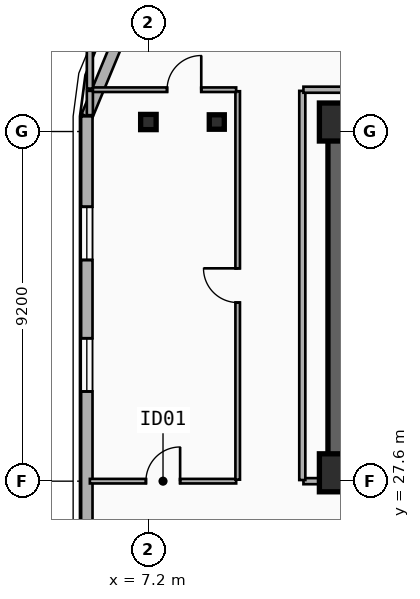
"""IFC4 building model, lengths in metres.
Left out: names, types, materials, properties, quantities, classifications, styles, units other than length and angle.
Written with IfcOpenShell. Run it as: python <this file> out.ifc"""

import sys

from ifc_helpers import new_model, si_unit, direction, frame, frame_2d, origin, origin_2d, place, context, subcontext, project, spatial, rectangle, i_section, extrude, element, fill, save


model = new_model("IFC4")
c1 = context("Model", 3, precision=1e-05, world=origin(), true_north=direction((0.0, 1.0)))
c2 = subcontext(c1, "Body", "Model", "MODEL_VIEW")
j1 = project(units=[si_unit("LENGTHUNIT", "METRE"), si_unit("PLANEANGLEUNIT", "RADIAN")], contexts=[c1])
p1 = place(None, origin())
s1 = spatial("IfcSite", under=j1, at=p1, CompositionType="ELEMENT")
p2 = place(p1, origin())
s2 = spatial("IfcBuilding", under=s1, at=p2, CompositionType="ELEMENT")
p3 = place(p2, frame((0.0, 0.0, 236.4)))
s3 = spatial("IfcBuildingStorey", under=s2, at=p3, CompositionType="ELEMENT", Elevation=236.4)
p4 = place(p3, frame((12.15, 37.05, 0.0), z_axis=(0.0, 0.0, 1.0), x_axis=(1.0, 0.0, 0.0)))
e1 = element("IfcWall", 1, at=p4, inside=s3, PredefinedType="SHEAR", context=c2, shape_type="SweptSolid", body=[
    extrude(rectangle(XDim=33.23, YDim=0.45, at=frame_2d((16.615, 0.0))), origin(), (0.0, 0.0, 1.0), 3.6),
])
p5 = place(p3, frame((21.18, 27.82, 0.0), z_axis=(0.0, 0.0, 1.0), x_axis=(-1.0, 0.0, 0.0)))
e2 = element("IfcWall", 2, at=p5, inside=s3, PredefinedType="SHEAR", context=c2, shape_type="SweptSolid", body=[
    extrude(rectangle(XDim=9.03, YDim=0.45, at=frame_2d((4.515, 0.0))), origin(), (0.0, 0.0, 1.0), 3.6),
])
p6 = place(p5, frame((2.68, 0.0, 0.0)))
e3 = element("IfcOpeningElement", 3, at=p6, cuts=e2, PredefinedType="OPENING", context=c2, shape_type="SweptSolid", body=[
    extrude(rectangle(XDim=1.1, YDim=2.15, at=frame_2d((0.55, 1.075))), frame((0.0, 0.235, 0.0), z_axis=(0.0, -1.0, 0.0), x_axis=(1.0, 0.0, 0.0)), (0.0, 0.0, 1.0), 0.47),
])
p7 = place(p3, frame((12.15, 28.045, 0.0), z_axis=(0.0, 0.0, 1.0), x_axis=(0.0, 1.0, 0.0)))
e4 = element("IfcWall", 4, at=p7, inside=s3, PredefinedType="SHEAR", context=c2, shape_type="SweptSolid", body=[
    extrude(rectangle(XDim=8.78, YDim=0.45, at=frame_2d((4.39, 0.0))), origin(), (0.0, 0.0, 1.0), 3.6),
])
for number, where, z_axis, x_axis in (
    (5, (12.2, 27.82, 0.0), (0.0, 0.0, 1.0), (1.0, 0.0, 0.0)),
    (6, (12.2, 37.05, 0.0), (0.0, 0.0, 1.0), (1.0, 0.0, 0.0)),
):
    element("IfcColumn", number, at=place(p3, frame(where, z_axis=z_axis, x_axis=x_axis)), inside=s3, PredefinedType="COLUMN", context=c2, shape_type="SweptSolid", body=[
        extrude(rectangle(XDim=1.0, YDim=1.0, at=origin_2d()), origin(), (0.0, 0.0, 1.0), 3.6),
    ])
p8 = place(p3, frame((9.0, 37.05, 0.0), z_axis=(0.0, 0.0, 1.0), x_axis=(1.0, 0.0, 0.0)))
e7 = element("IfcColumn", 7, at=p8, inside=s3, PredefinedType="COLUMN", context=c2, shape_type="SweptSolid", body=[
    extrude(i_section(OverallWidth=0.395, OverallDepth=0.38, WebThickness=0.019, FlangeThickness=0.03, FilletRadius=0.015, at=origin_2d()), origin(), (0.0, 0.0, 1.0), 3.6),
])
p9 = place(p3, frame((7.2, 37.05, 0.0), z_axis=(0.0, 0.0, 1.0), x_axis=(1.0, 0.0, 0.0)))
e8 = element("IfcColumn", 8, at=p9, inside=s3, PredefinedType="COLUMN", context=c2, shape_type="SweptSolid", body=[
    extrude(i_section(OverallWidth=0.408, OverallDepth=0.4, WebThickness=0.025, FlangeThickness=0.039, FilletRadius=0.015, at=origin_2d()), origin(), (0.0, 0.0, 1.0), 3.6),
])
p10 = place(p3, frame((5.58, 37.2, 0.0), z_axis=(0.0, 0.0, 1.0), x_axis=(0.382636798336, 0.92389884758, 0.0)))
e9 = element("IfcWall", 9, at=p10, inside=s3, PredefinedType="SOLIDWALL", context=c2, shape_type="SweptSolid", body=[
    extrude(rectangle(XDim=3.077, YDim=0.3, at=frame_2d((1.538, 0.0))), origin(), (0.0, 0.0, 1.0), 3.34),
])
p11 = place(p3, frame((5.58, 8.6, 0.0), z_axis=(0.0, 0.0, 1.0), x_axis=(0.0, 1.0, 0.0)))
e10 = element("IfcWall", 10, at=p11, inside=s3, PredefinedType="SOLIDWALL", context=c2, shape_type="SweptSolid", body=[
    extrude(rectangle(XDim=28.6, YDim=0.3, at=frame_2d((14.3, 0.0))), origin(), (0.0, 0.0, 1.0), 3.34),
])
p12 = place(p11, frame((21.36, 0.0, 0.34)))
e11 = element("IfcOpeningElement", 11, at=p12, cuts=e10, PredefinedType="OPENING", context=c2, shape_type="SweptSolid", body=[
    extrude(rectangle(XDim=1.4, YDim=2.1, at=frame_2d((0.7, 1.05))), frame((0.0, 0.16, 0.0), z_axis=(0.0, -1.0, 0.0), x_axis=(1.0, 0.0, 0.0)), (0.0, 0.0, 1.0), 0.32),
])
p13 = place(p11, frame((24.82, 0.0, 0.34)))
e12 = element("IfcOpeningElement", 12, at=p13, cuts=e10, PredefinedType="OPENING", context=c2, shape_type="SweptSolid", body=[
    extrude(rectangle(XDim=1.4, YDim=2.1, at=frame_2d((0.7, 1.05))), frame((0.0, 0.16, 0.0), z_axis=(0.0, -1.0, 0.0), x_axis=(1.0, 0.0, 0.0)), (0.0, 0.0, 1.0), 0.32),
])
p14 = place(p11, frame((4.797, 0.0, 0.34)))
e13 = element("IfcOpeningElement", 13, at=p14, cuts=e10, PredefinedType="OPENING", context=c2, shape_type="SweptSolid", body=[
    extrude(rectangle(XDim=1.4, YDim=2.1, at=frame_2d((0.7, 1.05))), frame((0.0, 0.16, 0.0), z_axis=(0.0, -1.0, 0.0), x_axis=(1.0, 0.0, 0.0)), (0.0, 0.0, 1.0), 0.32),
])
p15 = place(p11, frame((10.673, 0.0, 0.34)))
e14 = element("IfcOpeningElement", 14, at=p15, cuts=e10, PredefinedType="OPENING", context=c2, shape_type="SweptSolid", body=[
    extrude(rectangle(XDim=1.4, YDim=2.1, at=frame_2d((0.7, 1.05))), frame((0.0, 0.16, 0.0), z_axis=(0.0, -1.0, 0.0), x_axis=(1.0, 0.0, 0.0)), (0.0, 0.0, 1.0), 0.32),
])
p16 = place(p3, frame((5.66, 27.6, 0.0), z_axis=(0.0, 0.0, 1.0), x_axis=(1.0, 0.0, 0.0)))
e15 = element("IfcWall", 15, at=p16, inside=s3, PredefinedType="PARTITIONING", context=c2, shape_type="SweptSolid", body=[
    extrude(rectangle(XDim=3.85, YDim=0.12, at=frame_2d((1.925, 0.0))), origin(), (0.0, 0.0, 1.0), 2.67),
])
p17 = place(p16, frame((1.475, 0.0, 0.0)))
e16 = element("IfcOpeningElement", 16, at=p17, cuts=e15, PredefinedType="OPENING", context=c2, shape_type="SweptSolid", body=[
    extrude(rectangle(XDim=0.9, YDim=2.1, at=frame_2d((0.45, 1.05))), frame((0.0, 0.07, 0.0), z_axis=(0.0, -1.0, 0.0), x_axis=(1.0, 0.0, 0.0)), (0.0, 0.0, 1.0), 0.14),
])
p18 = place(p3, frame((9.55, 27.64, 0.0), z_axis=(0.0, 0.0, 1.0), x_axis=(0.0, 1.0, 0.0)))
e17 = element("IfcWall", 17, at=p18, inside=s3, PredefinedType="PARTITIONING", context=c2, shape_type="SweptSolid", body=[
    extrude(rectangle(XDim=10.22, YDim=0.12, at=frame_2d((5.11, 0.0))), origin(), (0.0, 0.0, 1.0), 2.82),
])
p19 = place(p18, frame((4.66, 0.0, 0.0)))
e18 = element("IfcOpeningElement", 18, at=p19, cuts=e17, PredefinedType="OPENING", context=c2, shape_type="SweptSolid", body=[
    extrude(rectangle(XDim=0.9, YDim=2.1, at=frame_2d((0.45, 1.05))), frame((0.0, 0.07, 0.0), z_axis=(0.0, -1.0, 0.0), x_axis=(1.0, 0.0, 0.0)), (0.0, 0.0, 1.0), 0.14),
])
p20 = place(p3, frame((5.66, 37.9, 0.0), z_axis=(0.0, 0.0, 1.0), x_axis=(1.0, 0.0, 0.0)))
e19 = element("IfcWall", 19, at=p20, inside=s3, PredefinedType="PARTITIONING", context=c2, shape_type="SweptSolid", body=[
    extrude(rectangle(XDim=3.85, YDim=0.12, at=frame_2d((1.925, 0.0))), origin(), (0.0, 0.0, 1.0), 3.34),
])
p21 = place(p20, frame((2.031, 0.0, 0.0)))
e20 = element("IfcOpeningElement", 20, at=p21, cuts=e19, PredefinedType="OPENING", context=c2, shape_type="SweptSolid", body=[
    extrude(rectangle(XDim=0.9, YDim=2.1, at=frame_2d((0.45, 1.05))), frame((0.0, 0.07, 0.0), z_axis=(0.0, -1.0, 0.0), x_axis=(1.0, 0.0, 0.0)), (0.0, 0.0, 1.0), 0.14),
])
p22 = place(p3, frame((11.28, 27.6, 0.0), z_axis=(0.0, 0.0, 1.0), x_axis=(1.0, 0.0, 0.0)))
e21 = element("IfcWall", 21, at=p22, inside=s3, PredefinedType="PARTITIONING", context=c2, shape_type="SweptSolid", body=[
    extrude(rectangle(XDim=0.84, YDim=0.16, at=frame_2d((0.42, 0.0))), origin(), (0.0, 0.0, 1.0), 2.41),
])
p23 = place(p3, frame((11.25, 27.63, 0.0), z_axis=(0.0, 0.0, 1.0), x_axis=(0.0, 1.0, 0.0)))
e22 = element("IfcWall", 22, at=p23, inside=s3, PredefinedType="PARTITIONING", context=c2, shape_type="SweptSolid", body=[
    extrude(rectangle(XDim=10.24, YDim=0.16, at=frame_2d((5.12, 0.0))), origin(), (0.0, 0.0, 1.0), 2.82),
])
p24 = place(p3, frame((11.28, 37.9, 0.0), z_axis=(0.0, 0.0, 1.0), x_axis=(1.0, 0.0, 0.0)))
e23 = element("IfcWall", 23, at=p24, inside=s3, PredefinedType="PARTITIONING", context=c2, shape_type="SweptSolid", body=[
    extrude(rectangle(XDim=35.04, YDim=0.16, at=frame_2d((17.52, 0.0))), origin(), (0.0, 0.0, 1.0), 3.34),
])
p25 = place(p3, frame((5.66, 37.93, 0.0), z_axis=(0.0, 0.0, 1.0), x_axis=(0.0, 1.0, 0.0)))
e24 = element("IfcWall", 24, at=p25, inside=s3, PredefinedType="PARTITIONING", context=c2, shape_type="SweptSolid", body=[
    extrude(rectangle(XDim=1.44, YDim=0.16, at=frame_2d((0.72, 0.0))), origin(), (0.0, 0.0, 1.0), 3.34),
])
p26 = place(p3, frame((5.66, 37.23, 0.0), z_axis=(0.0, 0.0, 1.0), x_axis=(0.0, 1.0, 0.0)))
e25 = element("IfcWall", 25, at=p26, inside=s3, PredefinedType="PARTITIONING", context=c2, shape_type="SweptSolid", body=[
    extrude(rectangle(XDim=0.64, YDim=0.16, at=frame_2d((0.32, 0.0))), origin(), (0.0, 0.0, 1.0), 3.34),
])
p27 = place(p12, origin())
e26 = element("IfcWindow", 26, at=p27, inside=s3, PartitioningType="SINGLE_PANEL", PredefinedType="WINDOW", context=c2, shape_type="SweptSolid", body=[
    extrude(rectangle(XDim=1.4, YDim=2.1, at=frame_2d((0.7, 1.05))), frame((0.0, 0.03, 0.0), z_axis=(0.0, -1.0, 0.0), x_axis=(1.0, 0.0, 0.0)), (0.0, 0.0, 1.0), 0.06),
])
fill(e11, e26)
p28 = place(p13, origin())
e27 = element("IfcWindow", 27, at=p28, inside=s3, PartitioningType="SINGLE_PANEL", PredefinedType="WINDOW", context=c2, shape_type="SweptSolid", body=[
    extrude(rectangle(XDim=1.4, YDim=2.1, at=frame_2d((0.7, 1.05))), frame((0.0, 0.03, 0.0), z_axis=(0.0, -1.0, 0.0), x_axis=(1.0, 0.0, 0.0)), (0.0, 0.0, 1.0), 0.06),
])
fill(e12, e27)
p29 = place(p17, origin())
e28 = element("IfcDoor", 28, at=p29, inside=s3, OperationType="SINGLE_SWING_RIGHT", PredefinedType="DOOR", context=c2, shape_type="SweptSolid", body=[
    extrude(rectangle(XDim=0.9, YDim=2.1, at=frame_2d((0.45, 1.05))), frame((0.0, 0.025, 0.0), z_axis=(0.0, -1.0, 0.0), x_axis=(1.0, 0.0, 0.0)), (0.0, 0.0, 1.0), 0.05),
])
fill(e16, e28)
p30 = place(p19, origin())
e29 = element("IfcDoor", 29, at=p30, inside=s3, OperationType="SINGLE_SWING_RIGHT", PredefinedType="DOOR", context=c2, shape_type="SweptSolid", body=[
    extrude(rectangle(XDim=0.9, YDim=2.1, at=frame_2d((0.45, 1.05))), frame((0.0, 0.025, 0.0), z_axis=(0.0, -1.0, 0.0), x_axis=(1.0, 0.0, 0.0)), (0.0, 0.0, 1.0), 0.05),
])
fill(e18, e29)
p31 = place(p21, origin())
e30 = element("IfcDoor", 30, at=p31, inside=s3, OperationType="SINGLE_SWING_RIGHT", PredefinedType="DOOR", context=c2, shape_type="SweptSolid", body=[
    extrude(rectangle(XDim=0.9, YDim=2.1, at=frame_2d((0.45, 1.05))), frame((0.0, 0.025, 0.0), z_axis=(0.0, -1.0, 0.0), x_axis=(1.0, 0.0, 0.0)), (0.0, 0.0, 1.0), 0.05),
])
fill(e20, e30)
save(model, sys.argv[1])
